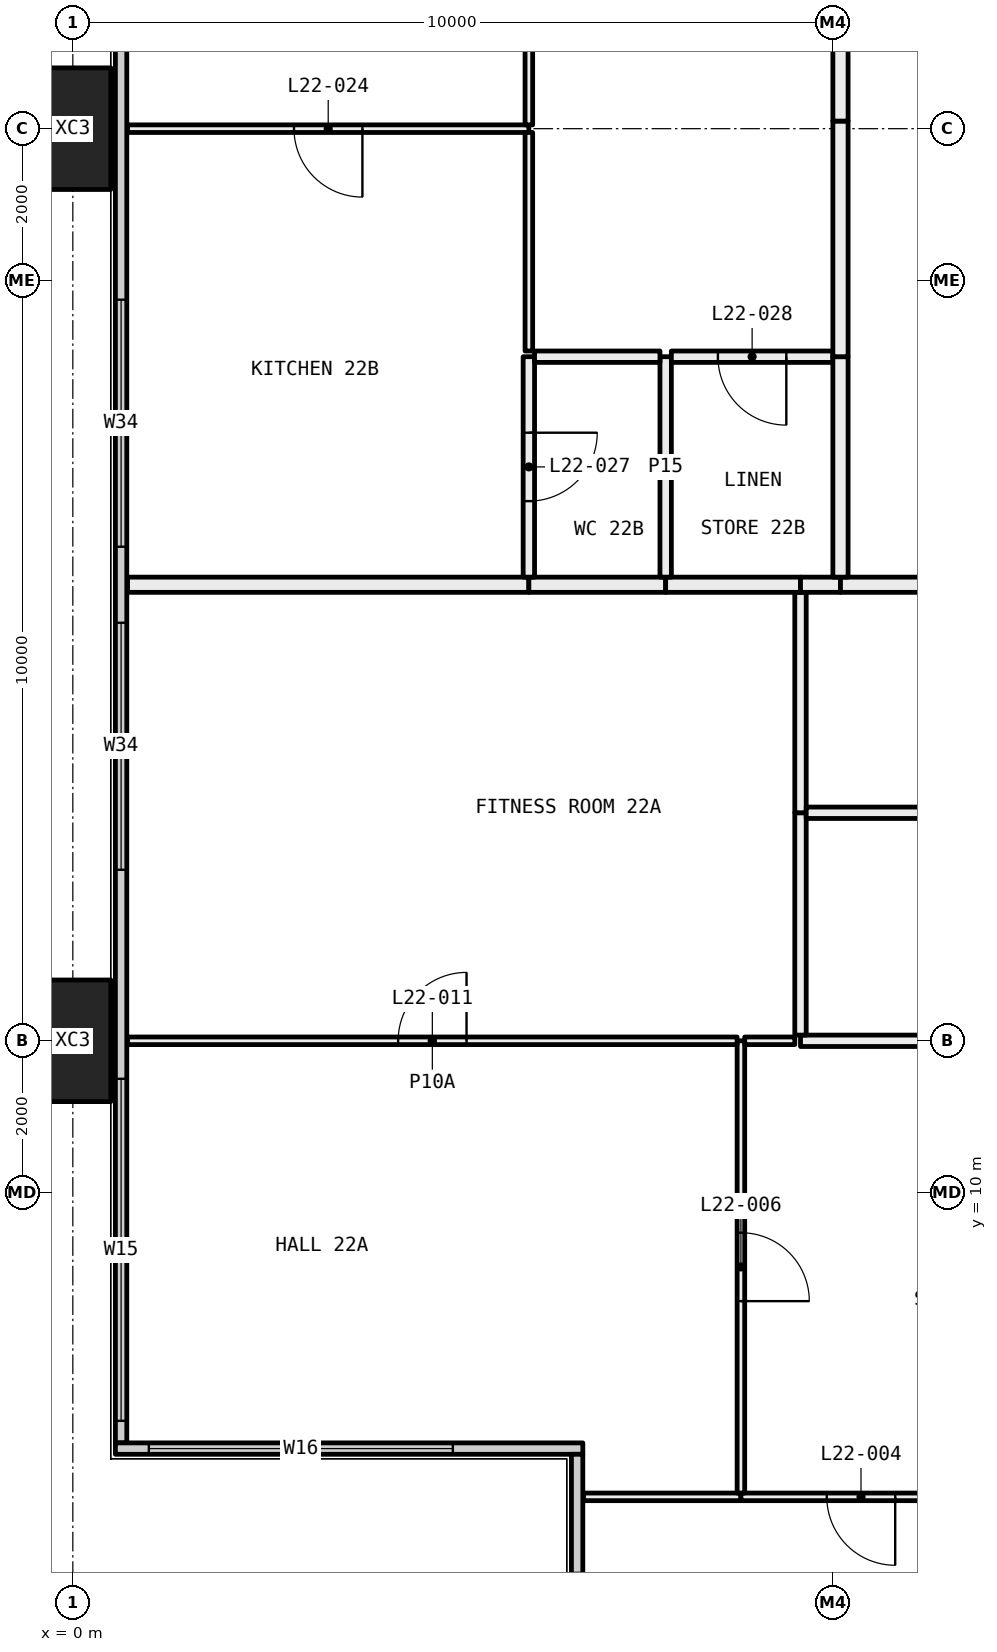
"""IFC4 building model, lengths in metres.
Left out: names, types, materials, properties, quantities, classifications, styles, units other than length and angle.
Written with IfcOpenShell. Run it as: python <this file> out.ifc"""

import sys

from ifc_helpers import new_model, si_unit, direction, frame, frame_2d, origin, origin_2d, place, context, subcontext, project, spatial, rectangle, hollow_rectangle, extrude, element, fill, save


model = new_model("IFC4")
c1 = context("Model", 3, precision=1e-05, world=origin(), true_north=direction((0.0, 1.0)))
c2 = subcontext(c1, "Body", "Model", "MODEL_VIEW")
j1 = project(units=[si_unit("LENGTHUNIT", "METRE"), si_unit("PLANEANGLEUNIT", "RADIAN")], contexts=[c1])
p1 = place(None, origin())
s1 = spatial("IfcSite", under=j1, at=p1, CompositionType="ELEMENT")
p2 = place(p1, origin())
s2 = spatial("IfcBuilding", under=s1, at=p2, CompositionType="ELEMENT")
p3 = place(p2, frame((0.0, 0.0, 88.65)))
s3 = spatial("IfcBuildingStorey", under=s2, at=p3, CompositionType="ELEMENT", Elevation=88.65)
for number, where, z_axis, x_axis in (
    (1, (0.0, 12.0, -0.4), (0.0, 0.0, 1.0), (0.0, 1.0, 0.0)),
    (2, (0.0, 24.0, -0.4), (0.0, 0.0, 1.0), (0.0, 1.0, 0.0)),
):
    element("IfcColumn", number, at=place(p3, frame(where, z_axis=z_axis, x_axis=x_axis)), inside=s3, PredefinedType="COLUMN", context=c2, shape_type="SweptSolid", body=[
        extrude(hollow_rectangle(XDim=1.6, YDim=1.0, WallThickness=0.065, at=origin_2d()), origin(), (0.0, 0.0, 1.0), 3.45),
    ])
p4 = place(p3, frame((0.635, 6.71, 0.0), z_axis=(0.0, 0.0, 1.0), x_axis=(0.0, 1.0, 0.0)))
e3 = element("IfcWall", 3, at=p4, inside=s3, PredefinedType="ELEMENTEDWALL", context=c2, shape_type="SweptSolid", body=[
    extrude(rectangle(XDim=34.58, YDim=0.15, at=frame_2d((17.29, 0.0))), origin(), (0.0, 0.0, 1.0), 3.05),
])
p5 = place(p4, frame((0.29, 0.0, 0.45)))
e4 = element("IfcOpeningElement", 4, at=p5, cuts=e3, PredefinedType="OPENING", context=c2, shape_type="SweptSolid", body=[
    extrude(rectangle(XDim=4.5, YDim=2.55, at=frame_2d((2.25, 1.275))), frame((0.0, 0.085, 0.0), z_axis=(0.0, -1.0, 0.0), x_axis=(1.0, 0.0, 0.0)), (0.0, 0.0, 1.0), 0.17),
])
p6 = place(p4, frame((7.54, 0.0, 0.45)))
e5 = element("IfcOpeningElement", 5, at=p6, cuts=e3, PredefinedType="OPENING", context=c2, shape_type="SweptSolid", body=[
    extrude(rectangle(XDim=3.25, YDim=2.55, at=frame_2d((1.625, 1.275))), frame((0.0, 0.085, 0.0), z_axis=(0.0, -1.0, 0.0), x_axis=(1.0, 0.0, 0.0)), (0.0, 0.0, 1.0), 0.17),
])
p7 = place(p4, frame((11.79, 0.0, 0.45)))
e6 = element("IfcOpeningElement", 6, at=p7, cuts=e3, PredefinedType="OPENING", context=c2, shape_type="SweptSolid", body=[
    extrude(rectangle(XDim=3.25, YDim=2.55, at=frame_2d((1.625, 1.275))), frame((0.0, 0.085, 0.0), z_axis=(0.0, -1.0, 0.0), x_axis=(1.0, 0.0, 0.0)), (0.0, 0.0, 1.0), 0.17),
])
p8 = place(p4, frame((19.54, 0.0, 0.45)))
e7 = element("IfcOpeningElement", 7, at=p8, cuts=e3, PredefinedType="OPENING", context=c2, shape_type="SweptSolid", body=[
    extrude(rectangle(XDim=3.25, YDim=2.55, at=frame_2d((1.625, 1.275))), frame((0.0, 0.085, 0.0), z_axis=(0.0, -1.0, 0.0), x_axis=(1.0, 0.0, 0.0)), (0.0, 0.0, 1.0), 0.17),
])
p9 = place(p4, frame((23.79, 0.0, 0.45)))
e8 = element("IfcOpeningElement", 8, at=p9, cuts=e3, PredefinedType="OPENING", context=c2, shape_type="SweptSolid", body=[
    extrude(rectangle(XDim=2.0, YDim=2.55, at=frame_2d((1.0, 1.275))), frame((0.0, 0.085, 0.0), z_axis=(0.0, -1.0, 0.0), x_axis=(1.0, 0.0, 0.0)), (0.0, 0.0, 1.0), 0.17),
])
p10 = place(p4, frame((29.79, 0.0, 0.45)))
e9 = element("IfcOpeningElement", 9, at=p10, cuts=e3, PredefinedType="OPENING", context=c2, shape_type="SweptSolid", body=[
    extrude(rectangle(XDim=4.5, YDim=2.55, at=frame_2d((2.25, 1.275))), frame((0.0, 0.085, 0.0), z_axis=(0.0, -1.0, 0.0), x_axis=(1.0, 0.0, 0.0)), (0.0, 0.0, 1.0), 0.17),
])
p11 = place(p3, frame((0.56, 6.635, 0.0), z_axis=(0.0, 0.0, 1.0), x_axis=(1.0, 0.0, 0.0)))
e10 = element("IfcWall", 10, at=p11, inside=s3, PredefinedType="ELEMENTEDWALL", context=c2, shape_type="SweptSolid", body=[
    extrude(rectangle(XDim=6.15, YDim=0.15, at=frame_2d((3.075, 0.0))), origin(), (0.0, 0.0, 1.0), 3.05),
])
p12 = place(p11, frame((0.44, 0.0, 0.45)))
e11 = element("IfcOpeningElement", 11, at=p12, cuts=e10, PredefinedType="OPENING", context=c2, shape_type="SweptSolid", body=[
    extrude(rectangle(XDim=4.0, YDim=2.55, at=frame_2d((2.0, 1.275))), frame((0.0, 0.085, 0.0), z_axis=(0.0, -1.0, 0.0), x_axis=(1.0, 0.0, 0.0)), (0.0, 0.0, 1.0), 0.17),
])
p13 = place(p3, frame((6.635, 0.71, 0.0), z_axis=(0.0, 0.0, 1.0), x_axis=(0.0, 1.0, 0.0)))
e12 = element("IfcWall", 12, at=p13, inside=s3, PredefinedType="ELEMENTEDWALL", context=c2, shape_type="SweptSolid", body=[
    extrude(rectangle(XDim=5.85, YDim=0.15, at=frame_2d((2.925, 0.0))), origin(), (0.0, 0.0, 1.0), 3.05),
])
p14 = place(p13, frame((0.29, 0.0, 0.45)))
e13 = element("IfcOpeningElement", 13, at=p14, cuts=e12, PredefinedType="OPENING", context=c2, shape_type="SweptSolid", body=[
    extrude(rectangle(XDim=4.0, YDim=2.55, at=frame_2d((2.0, 1.275))), frame((0.0, 0.085, 0.0), z_axis=(0.0, -1.0, 0.0), x_axis=(1.0, 0.0, 0.0)), (0.0, 0.0, 1.0), 0.17),
])
p15 = place(p3, frame((8.79, 6.0, 0.0), z_axis=(0.0, 0.0, 1.0), x_axis=(-1.0, 0.0, 0.0)))
e14 = element("IfcWall", 14, at=p15, inside=s3, PredefinedType="PARTITIONING", context=c2, shape_type="SweptSolid", body=[
    extrude(rectangle(XDim=2.07, YDim=0.1, at=frame_2d((1.035, 0.0))), origin(), (0.0, 0.0, 1.0), 3.05),
])
p16 = place(p3, frame((11.95, 6.0, 0.0), z_axis=(0.0, 0.0, 1.0), x_axis=(-1.0, 0.0, 0.0)))
e15 = element("IfcWall", 15, at=p16, inside=s3, PredefinedType="PARTITIONING", context=c2, shape_type="SweptSolid", body=[
    extrude(rectangle(XDim=3.16, YDim=0.1, at=frame_2d((1.58, 0.0))), origin(), (0.0, 0.0, 1.0), 2.45),
])
p17 = place(p16, frame((1.13, 0.0, 0.0)))
e16 = element("IfcOpeningElement", 16, at=p17, cuts=e15, PredefinedType="OPENING", context=c2, shape_type="SweptSolid", body=[
    extrude(rectangle(XDim=0.9, YDim=2.1, at=frame_2d((0.45, 1.05))), frame((0.0, 0.06, 0.0), z_axis=(0.0, -1.0, 0.0), x_axis=(1.0, 0.0, 0.0)), (0.0, 0.0, 1.0), 0.12),
])
p18 = place(p3, frame((8.79, 6.05, 0.0), z_axis=(0.0, 0.0, 1.0), x_axis=(0.0, 1.0, 0.0)))
e17 = element("IfcWall", 17, at=p18, inside=s3, PredefinedType="PARTITIONING", context=c2, shape_type="SweptSolid", body=[
    extrude(rectangle(XDim=5.95, YDim=0.1, at=frame_2d((2.975, 0.0))), origin(), (0.0, 0.0, 1.0), 2.45),
])
p19 = place(p18, frame((2.525, 0.0, 0.0)))
e18 = element("IfcOpeningElement", 18, at=p19, cuts=e17, PredefinedType="OPENING", context=c2, shape_type="SweptSolid", body=[
    extrude(rectangle(XDim=0.9, YDim=2.1, at=frame_2d((0.45, 1.05))), frame((0.0, 0.06, 0.0), z_axis=(0.0, -1.0, 0.0), x_axis=(1.0, 0.0, 0.0)), (0.0, 0.0, 1.0), 0.12),
])
p20 = place(p3, frame((8.74, 12.0, 0.0), z_axis=(0.0, 0.0, 1.0), x_axis=(-1.0, 0.0, 0.0)))
e19 = element("IfcWall", 19, at=p20, inside=s3, PredefinedType="PARTITIONING", context=c2, shape_type="SweptSolid", body=[
    extrude(rectangle(XDim=8.02, YDim=0.1, at=frame_2d((4.01, 0.0))), origin(), (0.0, 0.0, 1.0), 2.45),
])
p21 = place(p20, frame((3.56, 0.0, 0.0)))
e20 = element("IfcOpeningElement", 20, at=p21, cuts=e19, PredefinedType="OPENING", context=c2, shape_type="SweptSolid", body=[
    extrude(rectangle(XDim=0.9, YDim=2.1, at=frame_2d((0.45, 1.05))), frame((0.0, 0.06, 0.0), z_axis=(0.0, -1.0, 0.0), x_axis=(1.0, 0.0, 0.0)), (0.0, 0.0, 1.0), 0.12),
])
p22 = place(p3, frame((9.499, 12.0, 0.0), z_axis=(0.0, 0.0, 1.0), x_axis=(-1.0, 0.0, 0.0)))
e21 = element("IfcWall", 21, at=p22, inside=s3, PredefinedType="PARTITIONING", context=c2, shape_type="SweptSolid", body=[
    extrude(rectangle(XDim=0.659, YDim=0.1, at=frame_2d((0.33, 0.0))), origin(), (0.0, 0.0, 1.0), 2.45),
])
p23 = place(p3, frame((11.2, 12.0, 0.0), z_axis=(0.0, 0.0, 1.0), x_axis=(-1.0, 0.0, 0.0)))
e22 = element("IfcWall", 22, at=p23, inside=s3, PredefinedType="PARTITIONING", context=c2, shape_type="SweptSolid", body=[
    extrude(rectangle(XDim=1.626, YDim=0.15, at=frame_2d((0.813, 0.0))), origin(), (0.0, 0.0, 1.0), 2.45),
])
p24 = place(p3, frame((9.574, 12.075, 0.0), z_axis=(0.0, 0.0, 1.0), x_axis=(0.0, 1.0, 0.0)))
e23 = element("IfcWall", 23, at=p24, inside=s3, PredefinedType="PARTITIONING", context=c2, shape_type="SweptSolid", body=[
    extrude(rectangle(XDim=2.925, YDim=0.15, at=frame_2d((1.462, 0.0))), origin(), (0.0, 0.0, 1.0), 2.45),
])
p25 = place(p3, frame((9.574, 15.0, 0.0), z_axis=(0.0, 0.0, 1.0), x_axis=(0.0, 1.0, 0.0)))
e24 = element("IfcWall", 24, at=p25, inside=s3, PredefinedType="PARTITIONING", context=c2, shape_type="SweptSolid", body=[
    extrude(rectangle(XDim=2.9, YDim=0.15, at=frame_2d((1.45, 0.0))), origin(), (0.0, 0.0, 1.0), 3.05),
])
p26 = place(p3, frame((6.0, 18.0, 0.0), z_axis=(0.0, 0.0, 1.0), x_axis=(-1.0, 0.0, 0.0)))
e25 = element("IfcWall", 25, at=p26, inside=s3, PredefinedType="PARTITIONING", context=c2, shape_type="SweptSolid", body=[
    extrude(rectangle(XDim=5.28, YDim=0.2, at=frame_2d((2.64, 0.0))), origin(), (0.0, 0.0, 1.0), 3.05),
])
p27 = place(p3, frame((7.8, 18.0, 0.0), z_axis=(0.0, 0.0, 1.0), x_axis=(-1.0, 0.0, 0.0)))
e26 = element("IfcWall", 26, at=p27, inside=s3, PredefinedType="PARTITIONING", context=c2, shape_type="SweptSolid", body=[
    extrude(rectangle(XDim=1.8, YDim=0.2, at=frame_2d((0.9, 0.0))), origin(), (0.0, 0.0, 1.0), 3.05),
])
p28 = place(p3, frame((9.574, 18.0, 0.0), z_axis=(0.0, 0.0, 1.0), x_axis=(-1.0, 0.0, 0.0)))
e27 = element("IfcWall", 27, at=p28, inside=s3, PredefinedType="PARTITIONING", context=c2, shape_type="SweptSolid", body=[
    extrude(rectangle(XDim=1.774, YDim=0.2, at=frame_2d((0.887, 0.0))), origin(), (0.0, 0.0, 1.0), 3.05),
])
p29 = place(p3, frame((15.0, 15.0, 0.0), z_axis=(0.0, 0.0, 1.0), x_axis=(-1.0, 0.0, 0.0)))
e28 = element("IfcWall", 28, at=p29, inside=s3, PredefinedType="PARTITIONING", context=c2, shape_type="SweptSolid", body=[
    extrude(rectangle(XDim=5.351, YDim=0.15, at=frame_2d((2.676, 0.0))), origin(), (0.0, 0.0, 1.0), 3.05),
])
p30 = place(p3, frame((10.1, 18.0, 0.0), z_axis=(0.0, 0.0, 1.0), x_axis=(-1.0, 0.0, 0.0)))
e29 = element("IfcWall", 29, at=p30, inside=s3, PredefinedType="PARTITIONING", context=c2, shape_type="SweptSolid", body=[
    extrude(rectangle(XDim=0.526, YDim=0.2, at=frame_2d((0.263, 0.0))), origin(), (0.0, 0.0, 1.0), 3.05),
])
p31 = place(p3, frame((15.0, 18.0, 0.0), z_axis=(0.0, 0.0, 1.0), x_axis=(-1.0, 0.0, 0.0)))
e30 = element("IfcWall", 30, at=p31, inside=s3, PredefinedType="PARTITIONING", context=c2, shape_type="SweptSolid", body=[
    extrude(rectangle(XDim=4.9, YDim=0.2, at=frame_2d((2.45, 0.0))), origin(), (0.0, 0.0, 1.0), 3.05),
])
p32 = place(p3, frame((6.0, 24.0, 0.0), z_axis=(0.0, 0.0, 1.0), x_axis=(-1.0, 0.0, 0.0)))
e31 = element("IfcWall", 31, at=p32, inside=s3, PredefinedType="PARTITIONING", context=c2, shape_type="SweptSolid", body=[
    extrude(rectangle(XDim=5.28, YDim=0.1, at=frame_2d((2.64, 0.0))), origin(), (0.0, 0.0, 1.0), 2.45),
])
p33 = place(p32, frame((2.19, 0.0, 0.0)))
e32 = element("IfcOpeningElement", 32, at=p33, cuts=e31, PredefinedType="OPENING", context=c2, shape_type="SweptSolid", body=[
    extrude(rectangle(XDim=0.9, YDim=2.1, at=frame_2d((0.45, 1.05))), frame((0.0, 0.06, 0.0), z_axis=(0.0, -1.0, 0.0), x_axis=(1.0, 0.0, 0.0)), (0.0, 0.0, 1.0), 0.12),
])
p34 = place(p3, frame((6.0, 18.1, 0.0), z_axis=(0.0, 0.0, 1.0), x_axis=(0.0, 1.0, 0.0)))
e33 = element("IfcWall", 33, at=p34, inside=s3, PredefinedType="PARTITIONING", context=c2, shape_type="SweptSolid", body=[
    extrude(rectangle(XDim=2.9, YDim=0.15, at=frame_2d((1.45, 0.0))), origin(), (0.0, 0.0, 1.0), 3.05),
])
p35 = place(p34, frame((1.0, 0.0, 0.0)))
e34 = element("IfcOpeningElement", 34, at=p35, cuts=e33, PredefinedType="OPENING", context=c2, shape_type="SweptSolid", body=[
    extrude(rectangle(XDim=0.9, YDim=2.1, at=frame_2d((0.45, 1.05))), frame((0.0, 0.085, 0.0), z_axis=(0.0, -1.0, 0.0), x_axis=(1.0, 0.0, 0.0)), (0.0, 0.0, 1.0), 0.17),
])
p36 = place(p3, frame((6.0, 21.075, 0.0), z_axis=(0.0, 0.0, 1.0), x_axis=(0.0, 1.0, 0.0)))
e35 = element("IfcWall", 35, at=p36, inside=s3, PredefinedType="PARTITIONING", context=c2, shape_type="SweptSolid", body=[
    extrude(rectangle(XDim=2.875, YDim=0.1, at=frame_2d((1.438, 0.0))), origin(), (0.0, 0.0, 1.0), 2.45),
])
p37 = place(p3, frame((6.0, 24.05, 0.0), z_axis=(0.0, 0.0, 1.0), x_axis=(0.0, 1.0, 0.0)))
e36 = element("IfcWall", 36, at=p37, inside=s3, PredefinedType="PARTITIONING", context=c2, shape_type="SweptSolid", body=[
    extrude(rectangle(XDim=8.95, YDim=0.1, at=frame_2d((4.475, 0.0))), origin(), (0.0, 0.0, 1.0), 2.45),
])
p38 = place(p3, frame((7.8, 18.1, 0.0), z_axis=(0.0, 0.0, 1.0), x_axis=(0.0, 1.0, 0.0)))
e37 = element("IfcWall", 37, at=p38, inside=s3, PredefinedType="PARTITIONING", context=c2, shape_type="SweptSolid", body=[
    extrude(rectangle(XDim=2.9, YDim=0.15, at=frame_2d((1.45, 0.0))), origin(), (0.0, 0.0, 1.0), 3.05),
])
p39 = place(p3, frame((7.725, 21.0, 0.0), z_axis=(0.0, 0.0, 1.0), x_axis=(-1.0, 0.0, 0.0)))
e38 = element("IfcWall", 38, at=p39, inside=s3, PredefinedType="PARTITIONING", context=c2, shape_type="SweptSolid", body=[
    extrude(rectangle(XDim=1.65, YDim=0.15, at=frame_2d((0.825, 0.0))), origin(), (0.0, 0.0, 1.0), 3.05),
])
p40 = place(p3, frame((10.0, 21.0, 0.0), z_axis=(0.0, 0.0, 1.0), x_axis=(-1.0, 0.0, 0.0)))
e39 = element("IfcWall", 39, at=p40, inside=s3, PredefinedType="PARTITIONING", context=c2, shape_type="SweptSolid", body=[
    extrude(rectangle(XDim=2.125, YDim=0.15, at=frame_2d((1.062, 0.0))), origin(), (0.0, 0.0, 1.0), 3.05),
])
p41 = place(p40, frame((0.613, 0.0, 0.0)))
e40 = element("IfcOpeningElement", 40, at=p41, cuts=e39, PredefinedType="OPENING", context=c2, shape_type="SweptSolid", body=[
    extrude(rectangle(XDim=0.9, YDim=2.1, at=frame_2d((0.45, 1.05))), frame((0.0, 0.085, 0.0), z_axis=(0.0, -1.0, 0.0), x_axis=(1.0, 0.0, 0.0)), (0.0, 0.0, 1.0), 0.17),
])
p42 = place(p3, frame((10.1, 18.1, 0.0), z_axis=(0.0, 0.0, 1.0), x_axis=(0.0, 1.0, 0.0)))
e41 = element("IfcWall", 41, at=p42, inside=s3, PredefinedType="PARTITIONING", context=c2, shape_type="SweptSolid", body=[
    extrude(rectangle(XDim=2.9, YDim=0.2, at=frame_2d((1.45, 0.0))), origin(), (0.0, 0.0, 1.0), 3.05),
])
p43 = place(p3, frame((10.1, 21.0, 0.0), z_axis=(0.0, 0.0, 1.0), x_axis=(0.0, 1.0, 0.0)))
e42 = element("IfcWall", 42, at=p43, inside=s3, PredefinedType="PARTITIONING", context=c2, shape_type="SweptSolid", body=[
    extrude(rectangle(XDim=3.1, YDim=0.2, at=frame_2d((1.55, 0.0))), origin(), (0.0, 0.0, 1.0), 2.45),
])
p44 = place(p3, frame((10.1, 24.1, 0.0), z_axis=(0.0, 0.0, 1.0), x_axis=(0.0, 1.0, 0.0)))
e43 = element("IfcWall", 43, at=p44, inside=s3, PredefinedType="PARTITIONING", context=c2, shape_type="SweptSolid", body=[
    extrude(rectangle(XDim=8.9, YDim=0.2, at=frame_2d((4.45, 0.0))), origin(), (0.0, 0.0, 1.0), 3.05),
])
p45 = place(p5, origin())
e44 = element("IfcWindow", 44, at=p45, inside=s3, PartitioningType="SINGLE_PANEL", PredefinedType="WINDOW", context=c2, shape_type="SweptSolid", body=[
    extrude(rectangle(XDim=4.5, YDim=2.55, at=frame_2d((2.25, 1.275))), frame((0.0, 0.03, 0.0), z_axis=(0.0, -1.0, 0.0), x_axis=(1.0, 0.0, 0.0)), (0.0, 0.0, 1.0), 0.06),
])
fill(e4, e44)
p46 = place(p6, origin())
e45 = element("IfcWindow", 45, at=p46, inside=s3, PartitioningType="SINGLE_PANEL", PredefinedType="WINDOW", context=c2, shape_type="SweptSolid", body=[
    extrude(rectangle(XDim=3.25, YDim=2.55, at=frame_2d((1.625, 1.275))), frame((0.0, 0.03, 0.0), z_axis=(0.0, -1.0, 0.0), x_axis=(1.0, 0.0, 0.0)), (0.0, 0.0, 1.0), 0.06),
])
fill(e5, e45)
p47 = place(p7, origin())
e46 = element("IfcWindow", 46, at=p47, inside=s3, PartitioningType="SINGLE_PANEL", PredefinedType="WINDOW", context=c2, shape_type="SweptSolid", body=[
    extrude(rectangle(XDim=3.25, YDim=2.55, at=frame_2d((1.625, 1.275))), frame((0.0, 0.03, 0.0), z_axis=(0.0, -1.0, 0.0), x_axis=(1.0, 0.0, 0.0)), (0.0, 0.0, 1.0), 0.06),
])
fill(e6, e46)
p48 = place(p12, origin())
e47 = element("IfcWindow", 47, at=p48, inside=s3, PartitioningType="SINGLE_PANEL", PredefinedType="WINDOW", context=c2, shape_type="SweptSolid", body=[
    extrude(rectangle(XDim=4.0, YDim=2.55, at=frame_2d((2.0, 1.275))), frame((0.0, 0.03, 0.0), z_axis=(0.0, -1.0, 0.0), x_axis=(1.0, 0.0, 0.0)), (0.0, 0.0, 1.0), 0.06),
])
fill(e11, e47)
p49 = place(p17, origin())
e48 = element("IfcDoor", 48, at=p49, inside=s3, OperationType="SINGLE_SWING_RIGHT", PredefinedType="DOOR", context=c2, shape_type="SweptSolid", body=[
    extrude(rectangle(XDim=0.9, YDim=2.1, at=frame_2d((0.45, 1.05))), frame((0.0, 0.025, 0.0), z_axis=(0.0, -1.0, 0.0), x_axis=(1.0, 0.0, 0.0)), (0.0, 0.0, 1.0), 0.05),
])
fill(e16, e48)
p50 = place(p19, frame((0.9, 0.0, 0.0), x_axis=(-1.0, 0.0, 0.0)))
e49 = element("IfcDoor", 49, at=p50, inside=s3, OperationType="SINGLE_SWING_LEFT", PredefinedType="DOOR", context=c2, shape_type="SweptSolid", body=[
    extrude(rectangle(XDim=0.9, YDim=2.1, at=frame_2d((0.45, 1.05))), frame((0.0, 0.025, 0.0), z_axis=(0.0, -1.0, 0.0), x_axis=(1.0, 0.0, 0.0)), (0.0, 0.0, 1.0), 0.05),
])
fill(e18, e49)
p51 = place(p21, frame((0.9, 0.0, 0.0), x_axis=(-1.0, 0.0, 0.0)))
e50 = element("IfcDoor", 50, at=p51, inside=s3, OperationType="SINGLE_SWING_LEFT", PredefinedType="DOOR", context=c2, shape_type="SweptSolid", body=[
    extrude(rectangle(XDim=0.9, YDim=2.1, at=frame_2d((0.45, 1.05))), frame((0.0, 0.025, 0.0), z_axis=(0.0, -1.0, 0.0), x_axis=(1.0, 0.0, 0.0)), (0.0, 0.0, 1.0), 0.05),
])
fill(e20, e50)
p52 = place(p33, origin())
e51 = element("IfcDoor", 51, at=p52, inside=s3, OperationType="SINGLE_SWING_RIGHT", PredefinedType="DOOR", context=c2, shape_type="SweptSolid", body=[
    extrude(rectangle(XDim=0.9, YDim=2.1, at=frame_2d((0.45, 1.05))), frame((0.0, 0.025, 0.0), z_axis=(0.0, -1.0, 0.0), x_axis=(1.0, 0.0, 0.0)), (0.0, 0.0, 1.0), 0.05),
])
fill(e32, e51)
p53 = place(p35, frame((0.9, 0.0, 0.0), x_axis=(-1.0, 0.0, 0.0)))
e52 = element("IfcDoor", 52, at=p53, inside=s3, OperationType="SINGLE_SWING_RIGHT", PredefinedType="DOOR", context=c2, shape_type="SweptSolid", body=[
    extrude(rectangle(XDim=0.9, YDim=2.1, at=frame_2d((0.45, 1.05))), frame((0.0, 0.025, 0.0), z_axis=(0.0, -1.0, 0.0), x_axis=(1.0, 0.0, 0.0)), (0.0, 0.0, 1.0), 0.05),
])
fill(e34, e52)
p54 = place(p41, origin())
e53 = element("IfcDoor", 53, at=p54, inside=s3, OperationType="SINGLE_SWING_RIGHT", PredefinedType="DOOR", context=c2, shape_type="SweptSolid", body=[
    extrude(rectangle(XDim=0.9, YDim=2.1, at=frame_2d((0.45, 1.05))), frame((0.0, 0.025, 0.0), z_axis=(0.0, -1.0, 0.0), x_axis=(1.0, 0.0, 0.0)), (0.0, 0.0, 1.0), 0.05),
])
fill(e40, e53)
save(model, sys.argv[1])
